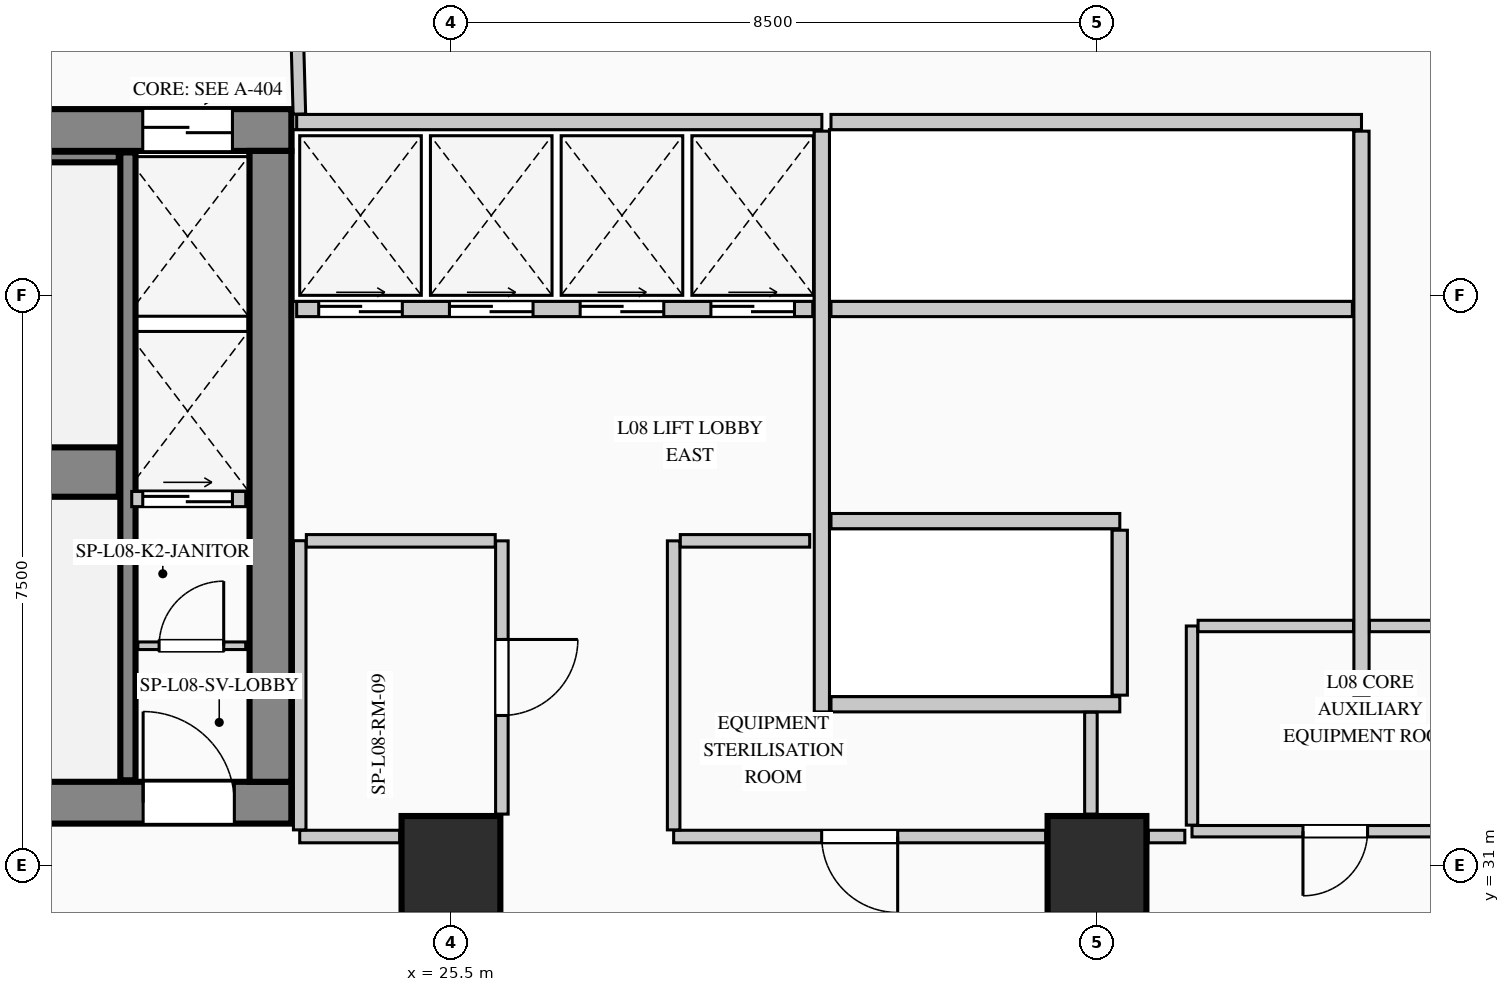
"""IFC4 building model, lengths in metres.
Left out: names, types, materials, properties, quantities, classifications, styles, units other than length and angle.
Written with IfcOpenShell. Run it as: python <this file> out.ifc"""

import sys

from ifc_helpers import new_model, si_unit, direction, frame, frame_2d, origin, origin_2d, place, context, subcontext, project, spatial, rectangle, extrude, element, fill, save


model = new_model("IFC4")
c1 = context("Model", 3, precision=1e-05, world=origin(), true_north=direction((0.0, 1.0)))
c2 = subcontext(c1, "Body", "Model", "MODEL_VIEW")
j1 = project(units=[si_unit("LENGTHUNIT", "METRE"), si_unit("PLANEANGLEUNIT", "RADIAN")], contexts=[c1])
p1 = place(None, origin())
s1 = spatial("IfcSite", under=j1, at=p1, CompositionType="ELEMENT")
p2 = place(p1, origin())
s2 = spatial("IfcBuilding", under=s1, at=p2, CompositionType="ELEMENT")
p3 = place(p2, frame((0.0, 0.0, 35.8)))
s3 = spatial("IfcBuildingStorey", under=s2, at=p3, CompositionType="ELEMENT", Elevation=35.8)
p4 = place(p3, frame((5.45, 40.675, 0.0), z_axis=(0.0, 0.0, 1.0), x_axis=(1.0, 0.0, 0.0)))
e1 = element("IfcWall", 1, at=p4, inside=s3, PredefinedType="SHEAR", context=c2, shape_type="SweptSolid", body=[
    extrude(rectangle(XDim=17.95, YDim=0.55, at=frame_2d((8.975, 0.0))), origin(), (0.0, 0.0, 1.0), 4.4),
])
p5 = place(p4, frame((15.995, 0.0, 0.0)))
e2 = element("IfcOpeningElement", 2, at=p5, cuts=e1, PredefinedType="OPENING", context=c2, shape_type="SweptSolid", body=[
    extrude(rectangle(XDim=1.18, YDim=2.25, at=frame_2d((0.59, 1.125))), frame((0.0, 0.285, 0.0), z_axis=(0.0, -1.0, 0.0), x_axis=(1.0, 0.0, 0.0)), (0.0, 0.0, 1.0), 0.57),
])
p6 = place(p3, frame((5.45, 31.825, 0.0), z_axis=(0.0, 0.0, 1.0), x_axis=(1.0, 0.0, 0.0)))
e3 = element("IfcWall", 3, at=p6, inside=s3, PredefinedType="SHEAR", context=c2, shape_type="SweptSolid", body=[
    extrude(rectangle(XDim=17.95, YDim=0.55, at=frame_2d((8.975, 0.0))), origin(), (0.0, 0.0, 1.0), 4.4),
])
p7 = place(p6, frame((3.2, 0.0, 0.0)))
e4 = element("IfcOpeningElement", 4, at=p7, cuts=e3, PredefinedType="OPENING", context=c2, shape_type="SweptSolid", body=[
    extrude(rectangle(XDim=1.2, YDim=2.2, at=frame_2d((0.6, 1.1))), frame((0.0, 0.285, 0.0), z_axis=(0.0, -1.0, 0.0), x_axis=(1.0, 0.0, 0.0)), (0.0, 0.0, 1.0), 0.57),
])
p8 = place(p6, frame((7.05, 0.0, 0.0)))
e5 = element("IfcOpeningElement", 5, at=p8, cuts=e3, PredefinedType="OPENING", context=c2, shape_type="SweptSolid", body=[
    extrude(rectangle(XDim=1.2, YDim=2.2, at=frame_2d((0.6, 1.1))), frame((0.0, 0.285, 0.0), z_axis=(0.0, -1.0, 0.0), x_axis=(1.0, 0.0, 0.0)), (0.0, 0.0, 1.0), 0.57),
])
p9 = place(p6, frame((8.9, 0.0, 0.0)))
e6 = element("IfcOpeningElement", 6, at=p9, cuts=e3, PredefinedType="OPENING", context=c2, shape_type="SweptSolid", body=[
    extrude(rectangle(XDim=1.15, YDim=2.2, at=frame_2d((0.575, 1.1))), frame((0.0, 0.285, 0.0), z_axis=(0.0, -1.0, 0.0), x_axis=(1.0, 0.0, 0.0)), (0.0, 0.0, 1.0), 0.57),
])
p10 = place(p6, frame((16.0, 0.0, 0.0)))
e7 = element("IfcOpeningElement", 7, at=p10, cuts=e3, PredefinedType="OPENING", context=c2, shape_type="SweptSolid", body=[
    extrude(rectangle(XDim=1.2, YDim=2.2, at=frame_2d((0.6, 1.1))), frame((0.0, 0.285, 0.0), z_axis=(0.0, -1.0, 0.0), x_axis=(1.0, 0.0, 0.0)), (0.0, 0.0, 1.0), 0.57),
])
p11 = place(p3, frame((23.125, 32.1, 0.0), z_axis=(0.0, 0.0, 1.0), x_axis=(0.0, 1.0, 0.0)))
e8 = element("IfcWall", 8, at=p11, inside=s3, PredefinedType="SHEAR", context=c2, shape_type="SweptSolid", body=[
    extrude(rectangle(XDim=8.3, YDim=0.55, at=frame_2d((4.15, 0.0))), origin(), (0.0, 0.0, 1.0), 4.4),
])
p12 = place(p3, frame((14.12, 36.175, 0.0), z_axis=(0.0, 0.0, 1.0), x_axis=(1.0, 0.0, 0.0)))
e9 = element("IfcWall", 9, at=p12, inside=s3, PredefinedType="SHEAR", context=c2, shape_type="SweptSolid", body=[
    extrude(rectangle(XDim=7.01, YDim=0.65, at=frame_2d((3.505, 0.0))), origin(), (0.0, 0.0, 1.0), 4.4),
])
p13 = place(p3, frame((21.25, 32.12, 0.0), z_axis=(0.0, 0.0, 1.0), x_axis=(0.0, 1.0, 0.0)))
e10 = element("IfcWall", 10, at=p13, inside=s3, PredefinedType="SHEAR", context=c2, shape_type="SweptSolid", body=[
    extrude(rectangle(XDim=8.26, YDim=0.2, at=frame_2d((4.13, 0.0))), origin(), (0.0, 0.0, 1.0), 4.4),
])
p14 = place(p3, frame((14.12, 40.32, 0.0), z_axis=(0.0, 0.0, 1.0), x_axis=(1.0, 0.0, 0.0)))
e11 = element("IfcWall", 11, at=p14, inside=s3, PredefinedType="SHEAR", context=c2, shape_type="SweptSolid", body=[
    extrude(rectangle(XDim=7.01, YDim=0.14, at=frame_2d((3.505, 0.0))), origin(), (0.0, 0.0, 1.0), 4.4),
])
for number, where, z_axis, x_axis in (
    (12, (25.5, 31.0, 0.0), (0.0, 0.0, 1.0), (1.0, 0.0, 0.0)),
    (13, (34.0, 31.0, 0.0), (0.0, 0.0, 1.0), (1.0, 0.0, 0.0)),
):
    element("IfcColumn", number, at=place(p3, frame(where, z_axis=z_axis, x_axis=x_axis)), inside=s3, PredefinedType="COLUMN", context=c2, shape_type="SweptSolid", body=[
        extrude(rectangle(XDim=1.3, YDim=1.3, at=origin_2d()), origin(), (0.0, 0.0, 1.0), 4.4),
    ])
p15 = place(p3, frame((21.38, 33.89, 0.0), z_axis=(0.0, 0.0, 1.0), x_axis=(1.0, 0.0, 0.0)))
e14 = element("IfcWall", 14, at=p15, inside=s3, PredefinedType="PARTITIONING", context=c2, shape_type="SweptSolid", body=[
    extrude(rectangle(XDim=1.42, YDim=0.1, at=frame_2d((0.71, 0.0))), origin(), (0.0, 0.0, 1.0), 4.1),
])
p16 = place(p15, frame((0.28, 0.0, 0.0)))
e15 = element("IfcOpeningElement", 15, at=p16, cuts=e14, PredefinedType="OPENING", context=c2, shape_type="SweptSolid", body=[
    extrude(rectangle(XDim=0.85, YDim=2.1, at=frame_2d((0.425, 1.05))), frame((0.0, 0.06, 0.0), z_axis=(0.0, -1.0, 0.0), x_axis=(1.0, 0.0, 0.0)), (0.0, 0.0, 1.0), 0.12),
])
p17 = place(p3, frame((21.3, 35.82, 0.0), z_axis=(0.0, 0.0, 1.0), x_axis=(1.0, 0.0, 0.0)))
e16 = element("IfcWall", 16, at=p17, inside=s3, PredefinedType="PARTITIONING", context=c2, shape_type="SweptSolid", body=[
    extrude(rectangle(XDim=1.5, YDim=0.2, at=frame_2d((0.75, 0.0))), origin(), (0.0, 0.0, 1.0), 4.1),
])
p18 = place(p17, frame((0.145, 0.0, 0.0)))
e17 = element("IfcOpeningElement", 17, at=p18, cuts=e16, PredefinedType="OPENING", context=c2, shape_type="SweptSolid", body=[
    extrude(rectangle(XDim=1.18, YDim=2.25, at=frame_2d((0.59, 1.125))), frame((0.0, 0.11, 0.0), z_axis=(0.0, -1.0, 0.0), x_axis=(1.0, 0.0, 0.0)), (0.0, 0.0, 1.0), 0.22),
])
p19 = place(p3, frame((23.47, 40.78, 0.0), z_axis=(0.0, 0.0, 1.0), x_axis=(1.0, 0.0, 0.0)))
e18 = element("IfcWall", 18, at=p19, inside=s3, PredefinedType="PARTITIONING", context=c2, shape_type="SweptSolid", body=[
    extrude(rectangle(XDim=6.91, YDim=0.2, at=frame_2d((3.455, 0.0))), origin(), (0.0, 0.0, 1.0), 4.1),
])
p20 = place(p3, frame((30.38, 33.02, 0.0), z_axis=(0.0, 0.0, 1.0), x_axis=(0.0, 1.0, 0.0)))
e19 = element("IfcWall", 19, at=p20, inside=s3, PredefinedType="PARTITIONING", context=c2, shape_type="SweptSolid", body=[
    extrude(rectangle(XDim=7.64, YDim=0.2, at=frame_2d((3.82, 0.0))), origin(), (0.0, 0.0, 1.0), 4.1),
])
p21 = place(p3, frame((23.47, 38.32, 0.0), z_axis=(0.0, 0.0, 1.0), x_axis=(1.0, 0.0, 0.0)))
e20 = element("IfcWall", 20, at=p21, inside=s3, PredefinedType="PARTITIONING", context=c2, shape_type="SweptSolid", body=[
    extrude(rectangle(XDim=6.79, YDim=0.2, at=frame_2d((3.395, 0.0))), origin(), (0.0, 0.0, 1.0), 4.1),
])
p22 = place(p21, frame((0.29, 0.0, 0.0)))
e21 = element("IfcOpeningElement", 21, at=p22, cuts=e20, PredefinedType="OPENING", context=c2, shape_type="SweptSolid", body=[
    extrude(rectangle(XDim=1.1, YDim=2.2, at=frame_2d((0.55, 1.1))), frame((0.0, 0.11, 0.0), z_axis=(0.0, -1.0, 0.0), x_axis=(1.0, 0.0, 0.0)), (0.0, 0.0, 1.0), 0.22),
])
p23 = place(p21, frame((2.01, 0.0, 0.0)))
e22 = element("IfcOpeningElement", 22, at=p23, cuts=e20, PredefinedType="OPENING", context=c2, shape_type="SweptSolid", body=[
    extrude(rectangle(XDim=1.1, YDim=2.2, at=frame_2d((0.55, 1.1))), frame((0.0, 0.11, 0.0), z_axis=(0.0, -1.0, 0.0), x_axis=(1.0, 0.0, 0.0)), (0.0, 0.0, 1.0), 0.22),
])
p24 = place(p21, frame((3.73, 0.0, 0.0)))
e23 = element("IfcOpeningElement", 23, at=p24, cuts=e20, PredefinedType="OPENING", context=c2, shape_type="SweptSolid", body=[
    extrude(rectangle(XDim=1.1, YDim=2.2, at=frame_2d((0.55, 1.1))), frame((0.0, 0.11, 0.0), z_axis=(0.0, -1.0, 0.0), x_axis=(1.0, 0.0, 0.0)), (0.0, 0.0, 1.0), 0.22),
])
p25 = place(p21, frame((5.45, 0.0, 0.0)))
e24 = element("IfcOpeningElement", 24, at=p25, cuts=e20, PredefinedType="OPENING", context=c2, shape_type="SweptSolid", body=[
    extrude(rectangle(XDim=1.1, YDim=2.2, at=frame_2d((0.55, 1.1))), frame((0.0, 0.11, 0.0), z_axis=(0.0, -1.0, 0.0), x_axis=(1.0, 0.0, 0.0)), (0.0, 0.0, 1.0), 0.22),
])
p26 = place(p3, frame((30.5, 40.78, 0.0), z_axis=(0.0, 0.0, 1.0), x_axis=(1.0, 0.0, 0.0)))
e25 = element("IfcWall", 25, at=p26, inside=s3, PredefinedType="PARTITIONING", context=c2, shape_type="SweptSolid", body=[
    extrude(rectangle(XDim=6.98, YDim=0.2, at=frame_2d((3.49, 0.0))), origin(), (0.0, 0.0, 1.0), 4.1),
])
p27 = place(p3, frame((37.48, 33.24, 0.0), z_axis=(0.0, 0.0, 1.0), x_axis=(0.0, 1.0, 0.0)))
e26 = element("IfcWall", 26, at=p27, inside=s3, PredefinedType="PARTITIONING", context=c2, shape_type="SweptSolid", body=[
    extrude(rectangle(XDim=7.42, YDim=0.2, at=frame_2d((3.71, 0.0))), origin(), (0.0, 0.0, 1.0), 4.1),
])
p28 = place(p3, frame((30.5, 38.32, 0.0), z_axis=(0.0, 0.0, 1.0), x_axis=(1.0, 0.0, 0.0)))
e27 = element("IfcWall", 27, at=p28, inside=s3, PredefinedType="PARTITIONING", context=c2, shape_type="SweptSolid", body=[
    extrude(rectangle(XDim=6.86, YDim=0.2, at=frame_2d((3.43, 0.0))), origin(), (0.0, 0.0, 1.0), 4.1),
])
for number, where, z_axis, x_axis in (
    (28, (30.5, 35.53, 0.0), (0.0, 0.0, 1.0), (1.0, 0.0, 0.0)),
    (29, (30.5, 33.12, 0.0), (0.0, 0.0, 1.0), (1.0, 0.0, 0.0)),
):
    element("IfcWall", number, at=place(p3, frame(where, z_axis=z_axis, x_axis=x_axis)), inside=s3, PredefinedType="PARTITIONING", context=c2, shape_type="SweptSolid", body=[
        extrude(rectangle(XDim=3.8, YDim=0.2, at=frame_2d((1.9, 0.0))), origin(), (0.0, 0.0, 1.0), 4.1),
    ])
p29 = place(p3, frame((34.3, 33.24, 0.0), z_axis=(0.0, 0.0, 1.0), x_axis=(0.0, 1.0, 0.0)))
e30 = element("IfcWall", 30, at=p29, inside=s3, PredefinedType="PARTITIONING", context=c2, shape_type="SweptSolid", body=[
    extrude(rectangle(XDim=2.17, YDim=0.2, at=frame_2d((1.085, 0.0))), origin(), (0.0, 0.0, 1.0), 4.1),
])
p30 = place(p3, frame((39.02, 31.45, 0.0), z_axis=(0.0, 0.0, 1.0), x_axis=(-1.0, 0.0, 0.0)))
e31 = element("IfcWall", 31, at=p30, inside=s3, PredefinedType="PARTITIONING", context=c2, shape_type="SweptSolid", body=[
    extrude(rectangle(XDim=3.77, YDim=0.15, at=frame_2d((1.885, 0.0))), origin(), (0.0, 0.0, 1.0), 4.1),
])
p31 = place(p30, frame((1.46, 0.0, 0.0)))
e32 = element("IfcOpeningElement", 32, at=p31, cuts=e31, PredefinedType="OPENING", context=c2, shape_type="SweptSolid", body=[
    extrude(rectangle(XDim=0.85, YDim=2.1, at=frame_2d((0.425, 1.05))), frame((0.0, 0.085, 0.0), z_axis=(0.0, -1.0, 0.0), x_axis=(1.0, 0.0, 0.0)), (0.0, 0.0, 1.0), 0.17),
])
p32 = place(p3, frame((35.25, 31.53, 0.0), z_axis=(0.0, 0.0, 1.0), x_axis=(0.0, 1.0, 0.0)))
e33 = element("IfcWall", 33, at=p32, inside=s3, PredefinedType="PARTITIONING", context=c2, shape_type="SweptSolid", body=[
    extrude(rectangle(XDim=2.62, YDim=0.15, at=frame_2d((1.31, 0.0))), origin(), (0.0, 0.0, 1.0), 4.1),
])
p33 = place(p3, frame((37.585, 34.15, 0.0), z_axis=(0.0, 0.0, 1.0), x_axis=(1.0, 0.0, 0.0)))
e34 = element("IfcWall", 34, at=p33, inside=s3, PredefinedType="PARTITIONING", context=c2, shape_type="SweptSolid", body=[
    extrude(rectangle(XDim=1.435, YDim=0.15, at=frame_2d((0.718, 0.0))), origin(), (0.0, 0.0, 1.0), 4.1),
])
p34 = place(p3, frame((35.33, 34.15, 0.0), z_axis=(0.0, 0.0, 1.0), x_axis=(1.0, 0.0, 0.0)))
e35 = element("IfcWall", 35, at=p34, inside=s3, PredefinedType="PARTITIONING", context=c2, shape_type="SweptSolid", body=[
    extrude(rectangle(XDim=2.045, YDim=0.15, at=frame_2d((1.022, 0.0))), origin(), (0.0, 0.0, 1.0), 4.1),
])
p35 = place(p3, frame((33.92, 33.015, 0.0), z_axis=(0.0, 0.0, 1.0), x_axis=(0.0, -1.0, 0.0)))
e36 = element("IfcWall", 36, at=p35, inside=s3, PredefinedType="PARTITIONING", context=c2, shape_type="SweptSolid", body=[
    extrude(rectangle(XDim=1.34, YDim=0.165, at=frame_2d((0.67, 0.0))), origin(), (0.0, 0.0, 1.0), 4.1),
])
p36 = place(p3, frame((33.325, 31.38, 0.0), z_axis=(0.0, 0.0, 1.0), x_axis=(-1.0, 0.0, 0.0)))
e37 = element("IfcWall", 37, at=p36, inside=s3, PredefinedType="PARTITIONING", context=c2, shape_type="SweptSolid", body=[
    extrude(rectangle(XDim=4.895, YDim=0.165, at=frame_2d((2.448, 0.0))), origin(), (0.0, 0.0, 1.0), 4.1),
])
p37 = place(p36, frame((1.948, 0.0, 0.0)))
e38 = element("IfcOpeningElement", 38, at=p37, cuts=e37, PredefinedType="OPENING", context=c2, shape_type="SweptSolid", body=[
    extrude(rectangle(XDim=1.0, YDim=2.15, at=frame_2d((0.5, 1.075))), frame((0.0, 0.093, 0.0), z_axis=(0.0, -1.0, 0.0), x_axis=(1.0, 0.0, 0.0)), (0.0, 0.0, 1.0), 0.185),
])
p38 = place(p3, frame((28.43, 31.468, 0.0), z_axis=(0.0, 0.0, 1.0), x_axis=(0.0, 1.0, 0.0)))
e39 = element("IfcWall", 39, at=p38, inside=s3, PredefinedType="PARTITIONING", context=c2, shape_type="SweptSolid", body=[
    extrude(rectangle(XDim=3.802, YDim=0.165, at=frame_2d((1.901, 0.0))), origin(), (0.0, 0.0, 1.0), 4.1),
])
p39 = place(p3, frame((28.518, 35.27, 0.0), z_axis=(0.0, 0.0, 1.0), x_axis=(1.0, 0.0, 0.0)))
e40 = element("IfcWall", 40, at=p39, inside=s3, PredefinedType="PARTITIONING", context=c2, shape_type="SweptSolid", body=[
    extrude(rectangle(XDim=1.702, YDim=0.165, at=frame_2d((0.851, 0.0))), origin(), (0.0, 0.0, 1.0), 4.1),
])
p40 = place(p3, frame((26.17, 35.27, 0.0), z_axis=(0.0, 0.0, 1.0), x_axis=(0.0, -1.0, 0.0)))
e41 = element("IfcWall", 41, at=p40, inside=s3, PredefinedType="PARTITIONING", context=c2, shape_type="SweptSolid", body=[
    extrude(rectangle(XDim=3.595, YDim=0.165, at=frame_2d((1.797, 0.0))), origin(), (0.0, 0.0, 1.0), 4.1),
])
p41 = place(p40, frame((1.298, 0.0, 0.0)))
e42 = element("IfcOpeningElement", 42, at=p41, cuts=e41, PredefinedType="OPENING", context=c2, shape_type="SweptSolid", body=[
    extrude(rectangle(XDim=1.0, YDim=2.15, at=frame_2d((0.5, 1.075))), frame((0.0, 0.093, 0.0), z_axis=(0.0, -1.0, 0.0), x_axis=(1.0, 0.0, 0.0)), (0.0, 0.0, 1.0), 0.185),
])
p42 = place(p3, frame((24.825, 31.38, 0.0), z_axis=(0.0, 0.0, 1.0), x_axis=(-1.0, 0.0, 0.0)))
e43 = element("IfcWall", 43, at=p42, inside=s3, PredefinedType="PARTITIONING", context=c2, shape_type="SweptSolid", body=[
    extrude(rectangle(XDim=1.315, YDim=0.165, at=frame_2d((0.657, 0.0))), origin(), (0.0, 0.0, 1.0), 4.1),
])
p43 = place(p3, frame((23.51, 31.468, 0.0), z_axis=(0.0, 0.0, 1.0), x_axis=(0.0, 1.0, 0.0)))
e44 = element("IfcWall", 44, at=p43, inside=s3, PredefinedType="PARTITIONING", context=c2, shape_type="SweptSolid", body=[
    extrude(rectangle(XDim=3.804, YDim=0.165, at=frame_2d((1.902, 0.0))), origin(), (0.0, 0.0, 1.0), 4.1),
])
p44 = place(p3, frame((23.597, 35.27, 0.0), z_axis=(0.0, 0.0, 1.0), x_axis=(1.0, 0.0, 0.0)))
e45 = element("IfcWall", 45, at=p44, inside=s3, PredefinedType="PARTITIONING", context=c2, shape_type="SweptSolid", body=[
    extrude(rectangle(XDim=2.485, YDim=0.165, at=frame_2d((1.243, 0.0))), origin(), (0.0, 0.0, 1.0), 4.1),
])
p45 = place(p3, frame((23.506, 40.885, 0.0), z_axis=(0.0, 0.0, 1.0), x_axis=(-0.027441464163, 0.999623412113, 0.0)))
e46 = element("IfcWall", 46, at=p45, inside=s3, PredefinedType="PARTITIONING", context=c2, shape_type="SweptSolid", body=[
    extrude(rectangle(XDim=2.331, YDim=0.165, at=frame_2d((1.166, 0.0))), origin(), (0.0, 0.0, 1.0), 4.1),
])
p46 = place(p3, frame((35.156, 31.38, 0.0), z_axis=(0.0, 0.0, 1.0), x_axis=(-1.0, 0.0, 0.0)))
e47 = element("IfcWall", 47, at=p46, inside=s3, PredefinedType="PARTITIONING", context=c2, shape_type="SweptSolid", body=[
    extrude(rectangle(XDim=0.48, YDim=0.165, at=frame_2d((0.24, 0.0))), origin(), (0.0, 0.0, 1.0), 4.1),
])
p47 = place(p10, origin())
e48 = element("IfcDoor", 48, at=p47, inside=s3, OperationType="SINGLE_SWING_LEFT", PredefinedType="DOOR", context=c2, shape_type="SweptSolid", body=[
    extrude(rectangle(XDim=1.2, YDim=2.2, at=frame_2d((0.6, 1.1))), frame((0.0, 0.025, 0.0), z_axis=(0.0, -1.0, 0.0), x_axis=(1.0, 0.0, 0.0)), (0.0, 0.0, 1.0), 0.05),
])
fill(e7, e48)
p48 = place(p16, origin())
e49 = element("IfcDoor", 49, at=p48, inside=s3, OperationType="SINGLE_SWING_RIGHT", PredefinedType="DOOR", context=c2, shape_type="SweptSolid", body=[
    extrude(rectangle(XDim=0.85, YDim=2.1, at=frame_2d((0.425, 1.05))), frame((0.0, 0.025, 0.0), z_axis=(0.0, -1.0, 0.0), x_axis=(1.0, 0.0, 0.0)), (0.0, 0.0, 1.0), 0.05),
])
fill(e15, e49)
p49 = place(p5, origin())
e50 = element("IfcDoor", 50, at=p49, inside=s3, OperationType="DOUBLE_DOOR_SLIDING", PredefinedType="DOOR", context=c2, shape_type="SweptSolid", body=[
    extrude(rectangle(XDim=1.18, YDim=2.25, at=frame_2d((0.59, 1.125))), frame((0.0, 0.025, 0.0), z_axis=(0.0, -1.0, 0.0), x_axis=(1.0, 0.0, 0.0)), (0.0, 0.0, 1.0), 0.05),
])
fill(e2, e50)
p50 = place(p18, origin())
e51 = element("IfcDoor", 51, at=p50, inside=s3, OperationType="DOUBLE_DOOR_SLIDING", PredefinedType="DOOR", context=c2, shape_type="SweptSolid", body=[
    extrude(rectangle(XDim=1.18, YDim=2.25, at=frame_2d((0.59, 1.125))), frame((0.0, 0.025, 0.0), z_axis=(0.0, -1.0, 0.0), x_axis=(1.0, 0.0, 0.0)), (0.0, 0.0, 1.0), 0.05),
])
fill(e17, e51)
p51 = place(p22, origin())
e52 = element("IfcDoor", 52, at=p51, inside=s3, OperationType="DOUBLE_DOOR_SLIDING", PredefinedType="DOOR", context=c2, shape_type="SweptSolid", body=[
    extrude(rectangle(XDim=1.1, YDim=2.2, at=frame_2d((0.55, 1.1))), frame((0.0, 0.025, 0.0), z_axis=(0.0, -1.0, 0.0), x_axis=(1.0, 0.0, 0.0)), (0.0, 0.0, 1.0), 0.05),
])
fill(e21, e52)
p52 = place(p23, origin())
e53 = element("IfcDoor", 53, at=p52, inside=s3, OperationType="DOUBLE_DOOR_SLIDING", PredefinedType="DOOR", context=c2, shape_type="SweptSolid", body=[
    extrude(rectangle(XDim=1.1, YDim=2.2, at=frame_2d((0.55, 1.1))), frame((0.0, 0.025, 0.0), z_axis=(0.0, -1.0, 0.0), x_axis=(1.0, 0.0, 0.0)), (0.0, 0.0, 1.0), 0.05),
])
fill(e22, e53)
p53 = place(p24, origin())
e54 = element("IfcDoor", 54, at=p53, inside=s3, OperationType="DOUBLE_DOOR_SLIDING", PredefinedType="DOOR", context=c2, shape_type="SweptSolid", body=[
    extrude(rectangle(XDim=1.1, YDim=2.2, at=frame_2d((0.55, 1.1))), frame((0.0, 0.025, 0.0), z_axis=(0.0, -1.0, 0.0), x_axis=(1.0, 0.0, 0.0)), (0.0, 0.0, 1.0), 0.05),
])
fill(e23, e54)
p54 = place(p25, origin())
e55 = element("IfcDoor", 55, at=p54, inside=s3, OperationType="DOUBLE_DOOR_SLIDING", PredefinedType="DOOR", context=c2, shape_type="SweptSolid", body=[
    extrude(rectangle(XDim=1.1, YDim=2.2, at=frame_2d((0.55, 1.1))), frame((0.0, 0.025, 0.0), z_axis=(0.0, -1.0, 0.0), x_axis=(1.0, 0.0, 0.0)), (0.0, 0.0, 1.0), 0.05),
])
fill(e24, e55)
p55 = place(p31, origin())
e56 = element("IfcDoor", 56, at=p55, inside=s3, OperationType="SINGLE_SWING_RIGHT", PredefinedType="DOOR", context=c2, shape_type="SweptSolid", body=[
    extrude(rectangle(XDim=0.85, YDim=2.1, at=frame_2d((0.425, 1.05))), frame((0.0, 0.025, 0.0), z_axis=(0.0, -1.0, 0.0), x_axis=(1.0, 0.0, 0.0)), (0.0, 0.0, 1.0), 0.05),
])
fill(e32, e56)
p56 = place(p37, origin())
e57 = element("IfcDoor", 57, at=p56, inside=s3, OperationType="SINGLE_SWING_LEFT", PredefinedType="DOOR", context=c2, shape_type="SweptSolid", body=[
    extrude(rectangle(XDim=1.0, YDim=2.15, at=frame_2d((0.5, 1.075))), frame((0.0, 0.025, 0.0), z_axis=(0.0, -1.0, 0.0), x_axis=(1.0, 0.0, 0.0)), (0.0, 0.0, 1.0), 0.05),
])
fill(e38, e57)
p57 = place(p41, origin())
e58 = element("IfcDoor", 58, at=p57, inside=s3, OperationType="SINGLE_SWING_LEFT", PredefinedType="DOOR", context=c2, shape_type="SweptSolid", body=[
    extrude(rectangle(XDim=1.0, YDim=2.15, at=frame_2d((0.5, 1.075))), frame((0.0, 0.025, 0.0), z_axis=(0.0, -1.0, 0.0), x_axis=(1.0, 0.0, 0.0)), (0.0, 0.0, 1.0), 0.05),
])
fill(e42, e58)
save(model, sys.argv[1])
